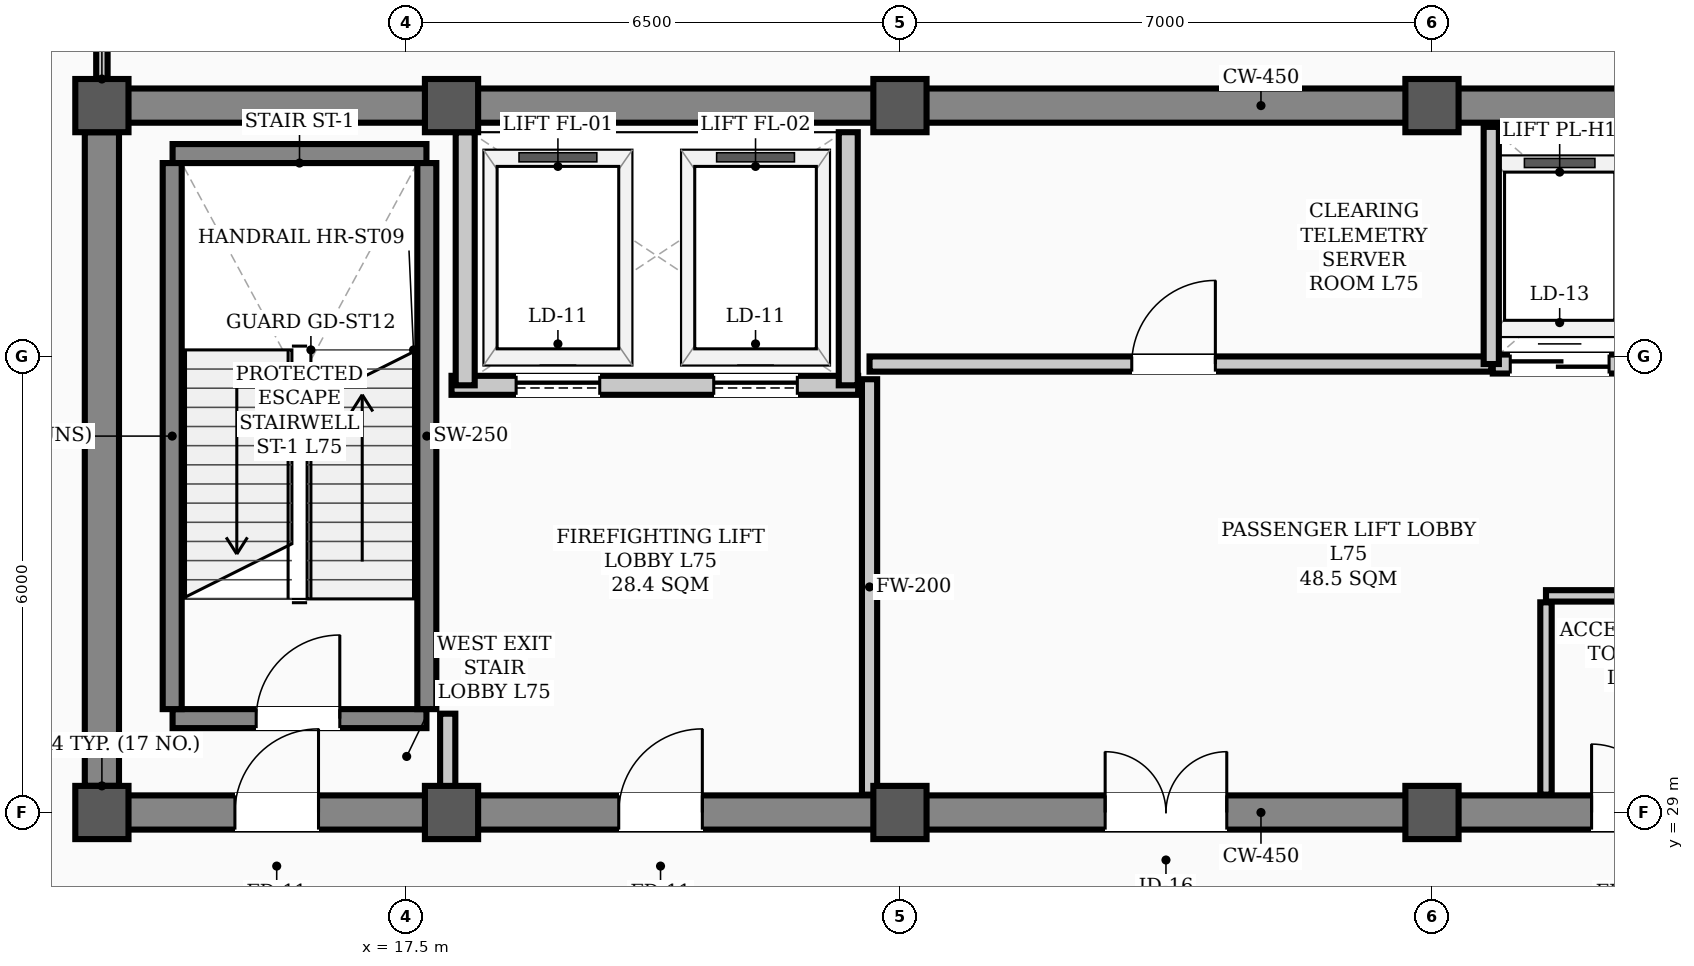
"""IFC4 building model, lengths in metres.
Left out: names, types, materials, properties, quantities, classifications, styles, units other than length and angle.
Written with IfcOpenShell. Run it as: python <this file> out.ifc"""

import sys

from ifc_helpers import new_model, si_unit, direction, frame, frame_2d, origin, origin_2d, place, context, subcontext, project, spatial, rectangle, hollow_rectangle, extrude, element, fill, save


model = new_model("IFC4")
c1 = context("Model", 3, precision=1e-05, world=origin(), true_north=direction((0.0, 1.0)))
c2 = subcontext(c1, "Body", "Model", "MODEL_VIEW")
j1 = project(units=[si_unit("LENGTHUNIT", "METRE"), si_unit("PLANEANGLEUNIT", "RADIAN")], contexts=[c1])
p1 = place(None, origin())
s1 = spatial("IfcSite", under=j1, at=p1, CompositionType="ELEMENT")
p2 = place(p1, origin())
s2 = spatial("IfcBuilding", under=s1, at=p2, CompositionType="ELEMENT")
p3 = place(p2, frame((0.0, 0.0, 300.8)))
s3 = spatial("IfcBuildingStorey", under=s2, at=p3, CompositionType="ELEMENT", Elevation=300.8)
for number, where, z_axis, x_axis in (
    (1, (13.5, 29.0, 0.0), (0.0, 0.0, 1.0), (1.0, 0.0, 0.0)),
    (2, (13.5, 38.3, 0.0), (0.0, 0.0, 1.0), (1.0, 0.0, 0.0)),
    (3, (18.1, 29.0, 0.0), (0.0, 0.0, 1.0), (1.0, 0.0, 0.0)),
    (4, (18.1, 38.3, 0.0), (0.0, 0.0, 1.0), (1.0, 0.0, 0.0)),
    (5, (24.0, 29.0, 0.0), (0.0, 0.0, 1.0), (1.0, 0.0, 0.0)),
    (6, (24.0, 38.3, 0.0), (0.0, 0.0, 1.0), (1.0, 0.0, 0.0)),
    (7, (31.0, 29.0, 0.0), (0.0, 0.0, 1.0), (1.0, 0.0, 0.0)),
    (8, (31.0, 38.3, 0.0), (0.0, 0.0, 1.0), (1.0, 0.0, 0.0)),
):
    element("IfcColumn", number, at=place(p3, frame(where, z_axis=z_axis, x_axis=x_axis)), inside=s3, PredefinedType="COLUMN", context=c2, shape_type="SweptSolid", body=[
        extrude(hollow_rectangle(XDim=0.7, YDim=0.7, WallThickness=0.028, InnerFilletRadius=0.014, OuterFilletRadius=0.042, at=origin_2d()), origin(), (0.0, 0.0, 1.0), 5.2),
    ])
p4 = place(p3, frame((13.5, 29.0, 0.0), z_axis=(0.0, 0.0, 1.0), x_axis=(1.0, 0.0, 0.0)))
e9 = element("IfcWall", 9, at=p4, inside=s3, PredefinedType="SHEAR", context=c2, shape_type="SweptSolid", body=[
    extrude(rectangle(XDim=30.5, YDim=0.45, at=frame_2d((15.25, 0.0))), origin(), (0.0, 0.0, 1.0), 4.9),
])
p5 = place(p4, frame((1.75, 0.0, 0.0)))
e10 = element("IfcOpeningElement", 10, at=p5, cuts=e9, PredefinedType="OPENING", context=c2, shape_type="SweptSolid", body=[
    extrude(rectangle(XDim=1.1, YDim=2.08, at=frame_2d((0.55, 1.04))), frame((0.0, 0.235, 0.0), z_axis=(0.0, -1.0, 0.0), x_axis=(1.0, 0.0, 0.0)), (0.0, 0.0, 1.0), 0.47),
])
p6 = place(p4, frame((26.7, 0.0, 0.0)))
e11 = element("IfcOpeningElement", 11, at=p6, cuts=e9, PredefinedType="OPENING", context=c2, shape_type="SweptSolid", body=[
    extrude(rectangle(XDim=1.1, YDim=2.08, at=frame_2d((0.55, 1.04))), frame((0.0, 0.235, 0.0), z_axis=(0.0, -1.0, 0.0), x_axis=(1.0, 0.0, 0.0)), (0.0, 0.0, 1.0), 0.47),
])
p7 = place(p4, frame((6.8, 0.0, 0.0)))
e12 = element("IfcOpeningElement", 12, at=p7, cuts=e9, PredefinedType="OPENING", context=c2, shape_type="SweptSolid", body=[
    extrude(rectangle(XDim=1.1, YDim=2.08, at=frame_2d((0.55, 1.04))), frame((0.0, 0.235, 0.0), z_axis=(0.0, -1.0, 0.0), x_axis=(1.0, 0.0, 0.0)), (0.0, 0.0, 1.0), 0.47),
])
p8 = place(p4, frame((13.2, 0.0, 0.0)))
e13 = element("IfcOpeningElement", 13, at=p8, cuts=e9, PredefinedType="OPENING", context=c2, shape_type="SweptSolid", body=[
    extrude(rectangle(XDim=1.6, YDim=2.08, at=frame_2d((0.8, 1.04))), frame((0.0, 0.235, 0.0), z_axis=(0.0, -1.0, 0.0), x_axis=(1.0, 0.0, 0.0)), (0.0, 0.0, 1.0), 0.47),
])
p9 = place(p4, frame((19.6, 0.0, 0.0)))
e14 = element("IfcOpeningElement", 14, at=p9, cuts=e9, PredefinedType="OPENING", context=c2, shape_type="SweptSolid", body=[
    extrude(rectangle(XDim=0.9, YDim=2.08, at=frame_2d((0.45, 1.04))), frame((0.0, 0.235, 0.0), z_axis=(0.0, -1.0, 0.0), x_axis=(1.0, 0.0, 0.0)), (0.0, 0.0, 1.0), 0.47),
])
p10 = place(p4, frame((21.6, 0.0, 0.0)))
e15 = element("IfcOpeningElement", 15, at=p10, cuts=e9, PredefinedType="OPENING", context=c2, shape_type="SweptSolid", body=[
    extrude(rectangle(XDim=0.9, YDim=2.08, at=frame_2d((0.45, 1.04))), frame((0.0, 0.235, 0.0), z_axis=(0.0, -1.0, 0.0), x_axis=(1.0, 0.0, 0.0)), (0.0, 0.0, 1.0), 0.47),
])
p11 = place(p3, frame((13.5, 38.3, 0.0), z_axis=(0.0, 0.0, 1.0), x_axis=(1.0, 0.0, 0.0)))
e16 = element("IfcWall", 16, at=p11, inside=s3, PredefinedType="SHEAR", context=c2, shape_type="SweptSolid", body=[
    extrude(rectangle(XDim=30.5, YDim=0.45, at=frame_2d((15.25, 0.0))), origin(), (0.0, 0.0, 1.0), 4.9),
])
p12 = place(p3, frame((13.5, 29.35, 0.0), z_axis=(0.0, 0.0, 1.0), x_axis=(0.0, 1.0, 0.0)))
e17 = element("IfcWall", 17, at=p12, inside=s3, PredefinedType="SHEAR", context=c2, shape_type="SweptSolid", body=[
    extrude(rectangle(XDim=8.6, YDim=0.45, at=frame_2d((4.3, 0.0))), origin(), (0.0, 0.0, 1.0), 4.9),
])
p13 = place(p3, frame((14.43, 30.235, 0.0), z_axis=(0.0, 0.0, 1.0), x_axis=(1.0, 0.0, 0.0)))
e18 = element("IfcWall", 18, at=p13, inside=s3, PredefinedType="STANDARD", context=c2, shape_type="SweptSolid", body=[
    extrude(rectangle(XDim=3.34, YDim=0.25, at=frame_2d((1.67, 0.0))), origin(), (0.0, 0.0, 1.0), 4.9),
])
p14 = place(p13, frame((1.1, 0.0, 0.0)))
e19 = element("IfcOpeningElement", 19, at=p14, cuts=e18, PredefinedType="OPENING", context=c2, shape_type="SweptSolid", body=[
    extrude(rectangle(XDim=1.1, YDim=2.08, at=frame_2d((0.55, 1.04))), frame((0.0, 0.135, 0.0), z_axis=(0.0, -1.0, 0.0), x_axis=(1.0, 0.0, 0.0)), (0.0, 0.0, 1.0), 0.27),
])
p15 = place(p3, frame((14.43, 37.669, 0.0), z_axis=(0.0, 0.0, 1.0), x_axis=(1.0, 0.0, 0.0)))
e20 = element("IfcWall", 20, at=p15, inside=s3, PredefinedType="STANDARD", context=c2, shape_type="SweptSolid", body=[
    extrude(rectangle(XDim=3.34, YDim=0.25, at=frame_2d((1.67, 0.0))), origin(), (0.0, 0.0, 1.0), 4.9),
])
for number, where, z_axis, x_axis in (
    (21, (14.425, 30.36, 0.0), (0.0, 0.0, 1.0), (0.0, 1.0, 0.0)),
    (22, (17.775, 30.36, 0.0), (0.0, 0.0, 1.0), (0.0, 1.0, 0.0)),
):
    element("IfcWall", number, at=place(p3, frame(where, z_axis=z_axis, x_axis=x_axis)), inside=s3, PredefinedType="STANDARD", context=c2, shape_type="SweptSolid", body=[
        extrude(rectangle(XDim=7.184, YDim=0.25, at=frame_2d((3.592, 0.0))), origin(), (0.0, 0.0, 1.0), 4.9),
    ])
p16 = place(p3, frame((18.1, 34.62, 0.0), z_axis=(0.0, 0.0, 1.0), x_axis=(1.0, 0.0, 0.0)))
e23 = element("IfcWall", 23, at=p16, inside=s3, PredefinedType="STANDARD", context=c2, shape_type="SweptSolid", body=[
    extrude(rectangle(XDim=5.35, YDim=0.25, at=frame_2d((2.675, 0.0))), origin(), (0.0, 0.0, 1.0), 4.9),
])
p17 = place(p16, frame((0.85, 0.0, 0.0)))
e24 = element("IfcOpeningElement", 24, at=p17, cuts=e23, PredefinedType="OPENING", context=c2, shape_type="SweptSolid", body=[
    extrude(rectangle(XDim=1.1, YDim=2.08, at=frame_2d((0.55, 1.04))), frame((0.0, 0.135, 0.0), z_axis=(0.0, -1.0, 0.0), x_axis=(1.0, 0.0, 0.0)), (0.0, 0.0, 1.0), 0.27),
])
p18 = place(p16, frame((3.45, 0.0, 0.0)))
e25 = element("IfcOpeningElement", 25, at=p18, cuts=e23, PredefinedType="OPENING", context=c2, shape_type="SweptSolid", body=[
    extrude(rectangle(XDim=1.1, YDim=2.08, at=frame_2d((0.55, 1.04))), frame((0.0, 0.135, 0.0), z_axis=(0.0, -1.0, 0.0), x_axis=(1.0, 0.0, 0.0)), (0.0, 0.0, 1.0), 0.27),
])
for number, where, z_axis, x_axis in (
    (26, (18.28, 34.62, 0.0), (0.0, 0.0, 1.0), (0.0, 1.0, 0.0)),
    (27, (23.32, 34.62, 0.0), (0.0, 0.0, 1.0), (0.0, 1.0, 0.0)),
):
    element("IfcWall", number, at=place(p3, frame(where, z_axis=z_axis, x_axis=x_axis)), inside=s3, PredefinedType="STANDARD", context=c2, shape_type="SweptSolid", body=[
        extrude(rectangle(XDim=3.33, YDim=0.25, at=frame_2d((1.665, 0.0))), origin(), (0.0, 0.0, 1.0), 4.9),
    ])
p19 = place(p3, frame((31.8, 34.9, 0.0), z_axis=(0.0, 0.0, 1.0), x_axis=(1.0, 0.0, 0.0)))
e28 = element("IfcWall", 28, at=p19, inside=s3, PredefinedType="STANDARD", context=c2, shape_type="SweptSolid", body=[
    extrude(rectangle(XDim=3.6, YDim=0.25, at=frame_2d((1.8, 0.0))), origin(), (0.0, 0.0, 1.0), 4.9),
])
p20 = place(p19, frame((0.23, 0.0, 0.0)))
e29 = element("IfcOpeningElement", 29, at=p20, cuts=e28, PredefinedType="OPENING", context=c2, shape_type="SweptSolid", body=[
    extrude(rectangle(XDim=1.3, YDim=2.08, at=frame_2d((0.65, 1.04))), frame((0.0, 0.135, 0.0), z_axis=(0.0, -1.0, 0.0), x_axis=(1.0, 0.0, 0.0)), (0.0, 0.0, 1.0), 0.27),
])
p21 = place(p19, frame((2.03, 0.0, 0.0)))
e30 = element("IfcOpeningElement", 30, at=p21, cuts=e28, PredefinedType="OPENING", context=c2, shape_type="SweptSolid", body=[
    extrude(rectangle(XDim=1.3, YDim=2.08, at=frame_2d((0.65, 1.04))), frame((0.0, 0.135, 0.0), z_axis=(0.0, -1.0, 0.0), x_axis=(1.0, 0.0, 0.0)), (0.0, 0.0, 1.0), 0.27),
])
p22 = place(p3, frame((23.6, 34.9, 0.0), z_axis=(0.0, 0.0, 1.0), x_axis=(1.0, 0.0, 0.0)))
e31 = element("IfcWall", 31, at=p22, inside=s3, PredefinedType="STANDARD", context=c2, shape_type="SweptSolid", body=[
    extrude(rectangle(XDim=8.18, YDim=0.2, at=frame_2d((4.09, 0.0))), origin(), (0.0, 0.0, 1.0), 4.9),
])
p23 = place(p22, frame((3.45, 0.0, 0.0)))
e32 = element("IfcOpeningElement", 32, at=p23, cuts=e31, PredefinedType="OPENING", context=c2, shape_type="SweptSolid", body=[
    extrude(rectangle(XDim=1.1, YDim=2.08, at=frame_2d((0.55, 1.04))), frame((0.0, 0.11, 0.0), z_axis=(0.0, -1.0, 0.0), x_axis=(1.0, 0.0, 0.0)), (0.0, 0.0, 1.0), 0.22),
])
p24 = place(p3, frame((32.5, 31.85, 0.0), z_axis=(0.0, 0.0, 1.0), x_axis=(1.0, 0.0, 0.0)))
e33 = element("IfcWall", 33, at=p24, inside=s3, PredefinedType="PARTITIONING", context=c2, shape_type="SweptSolid", body=[
    extrude(rectangle(XDim=4.1, YDim=0.15, at=frame_2d((2.05, 0.0))), origin(), (0.0, 0.0, 1.0), 4.9),
])
p25 = place(p3, frame((18.05, 29.235, 0.0), z_axis=(0.0, 0.0, 1.0), x_axis=(0.0, 1.0, 0.0)))
e34 = element("IfcWall", 34, at=p25, inside=s3, PredefinedType="STANDARD", context=c2, shape_type="SweptSolid", body=[
    extrude(rectangle(XDim=1.065, YDim=0.2, at=frame_2d((0.532, 0.0))), origin(), (0.0, 0.0, 1.0), 4.9),
])
p26 = place(p3, frame((23.6, 29.235, 0.0), z_axis=(0.0, 0.0, 1.0), x_axis=(0.0, 1.0, 0.0)))
e35 = element("IfcWall", 35, at=p26, inside=s3, PredefinedType="STANDARD", context=c2, shape_type="SweptSolid", body=[
    extrude(rectangle(XDim=5.465, YDim=0.2, at=frame_2d((2.732, 0.0))), origin(), (0.0, 0.0, 1.0), 3.48),
])
p27 = place(p3, frame((32.5, 29.235, 0.0), z_axis=(0.0, 0.0, 1.0), x_axis=(0.0, 1.0, 0.0)))
e36 = element("IfcWall", 36, at=p27, inside=s3, PredefinedType="PARTITIONING", context=c2, shape_type="SweptSolid", body=[
    extrude(rectangle(XDim=2.53, YDim=0.15, at=frame_2d((1.265, 0.0))), origin(), (0.0, 0.0, 1.0), 3.48),
])
p28 = place(p3, frame((13.5, 38.535, 0.0), z_axis=(0.0, 0.0, 1.0), x_axis=(0.0, 1.0, 0.0)))
e37 = element("IfcWall", 37, at=p28, inside=s3, PredefinedType="PARTITIONING", context=c2, shape_type="SweptSolid", body=[
    extrude(rectangle(XDim=2.405, YDim=0.15, at=frame_2d((1.203, 0.0))), origin(), (0.0, 0.0, 1.0), 4.9),
])
p29 = place(p3, frame((31.78, 34.9, 0.0), z_axis=(0.0, 0.0, 1.0), x_axis=(0.0, 1.0, 0.0)))
e38 = element("IfcWall", 38, at=p29, inside=s3, PredefinedType="STANDARD", context=c2, shape_type="SweptSolid", body=[
    extrude(rectangle(XDim=3.12, YDim=0.2, at=frame_2d((1.56, 0.0))), origin(), (0.0, 0.0, 1.0), 3.48),
])
p30 = place(p14, origin())
e39 = element("IfcDoor", 39, at=p30, inside=s3, OperationType="SINGLE_SWING_RIGHT", PredefinedType="DOOR", context=c2, shape_type="SweptSolid", body=[
    extrude(rectangle(XDim=1.1, YDim=2.08, at=frame_2d((0.55, 1.04))), frame((0.0, 0.025, 0.0), z_axis=(0.0, -1.0, 0.0), x_axis=(1.0, 0.0, 0.0)), (0.0, 0.0, 1.0), 0.05),
])
fill(e19, e39)
p31 = place(p5, origin())
e40 = element("IfcDoor", 40, at=p31, inside=s3, OperationType="SINGLE_SWING_RIGHT", PredefinedType="DOOR", context=c2, shape_type="SweptSolid", body=[
    extrude(rectangle(XDim=1.1, YDim=2.08, at=frame_2d((0.55, 1.04))), frame((0.0, 0.025, 0.0), z_axis=(0.0, -1.0, 0.0), x_axis=(1.0, 0.0, 0.0)), (0.0, 0.0, 1.0), 0.05),
])
fill(e10, e40)
p32 = place(p7, origin())
e41 = element("IfcDoor", 41, at=p32, inside=s3, OperationType="SINGLE_SWING_RIGHT", PredefinedType="DOOR", context=c2, shape_type="SweptSolid", body=[
    extrude(rectangle(XDim=1.1, YDim=2.08, at=frame_2d((0.55, 1.04))), frame((0.0, 0.025, 0.0), z_axis=(0.0, -1.0, 0.0), x_axis=(1.0, 0.0, 0.0)), (0.0, 0.0, 1.0), 0.05),
])
fill(e12, e41)
p33 = place(p8, origin())
e42 = element("IfcDoor", 42, at=p33, inside=s3, OperationType="DOUBLE_DOOR_SINGLE_SWING", PredefinedType="DOOR", context=c2, shape_type="SweptSolid", body=[
    extrude(rectangle(XDim=1.6, YDim=2.08, at=frame_2d((0.8, 1.04))), frame((0.0, 0.025, 0.0), z_axis=(0.0, -1.0, 0.0), x_axis=(1.0, 0.0, 0.0)), (0.0, 0.0, 1.0), 0.05),
])
fill(e13, e42)
p34 = place(p23, origin())
e43 = element("IfcDoor", 43, at=p34, inside=s3, OperationType="SINGLE_SWING_RIGHT", PredefinedType="DOOR", context=c2, shape_type="SweptSolid", body=[
    extrude(rectangle(XDim=1.1, YDim=2.08, at=frame_2d((0.55, 1.04))), frame((0.0, 0.025, 0.0), z_axis=(0.0, -1.0, 0.0), x_axis=(1.0, 0.0, 0.0)), (0.0, 0.0, 1.0), 0.05),
])
fill(e32, e43)
p35 = place(p9, origin())
e44 = element("IfcDoor", 44, at=p35, inside=s3, OperationType="SINGLE_SWING_LEFT", PredefinedType="DOOR", context=c2, shape_type="SweptSolid", body=[
    extrude(rectangle(XDim=0.9, YDim=2.08, at=frame_2d((0.45, 1.04))), frame((0.0, 0.025, 0.0), z_axis=(0.0, -1.0, 0.0), x_axis=(1.0, 0.0, 0.0)), (0.0, 0.0, 1.0), 0.05),
])
fill(e14, e44)
p36 = place(p17, origin())
e45 = element("IfcDoor", 45, at=p36, inside=s3, OperationType="SLIDING_TO_LEFT", PredefinedType="DOOR", context=c2, shape_type="SweptSolid", body=[
    extrude(rectangle(XDim=1.1, YDim=2.08, at=frame_2d((0.55, 1.04))), frame((0.0, 0.025, 0.0), z_axis=(0.0, -1.0, 0.0), x_axis=(1.0, 0.0, 0.0)), (0.0, 0.0, 1.0), 0.05),
])
fill(e24, e45)
p37 = place(p18, origin())
e46 = element("IfcDoor", 46, at=p37, inside=s3, OperationType="SLIDING_TO_LEFT", PredefinedType="DOOR", context=c2, shape_type="SweptSolid", body=[
    extrude(rectangle(XDim=1.1, YDim=2.08, at=frame_2d((0.55, 1.04))), frame((0.0, 0.025, 0.0), z_axis=(0.0, -1.0, 0.0), x_axis=(1.0, 0.0, 0.0)), (0.0, 0.0, 1.0), 0.05),
])
fill(e25, e46)
p38 = place(p20, origin())
e47 = element("IfcDoor", 47, at=p38, inside=s3, OperationType="DOUBLE_DOOR_SLIDING", PredefinedType="DOOR", context=c2, shape_type="SweptSolid", body=[
    extrude(rectangle(XDim=1.3, YDim=2.08, at=frame_2d((0.65, 1.04))), frame((0.0, 0.025, 0.0), z_axis=(0.0, -1.0, 0.0), x_axis=(1.0, 0.0, 0.0)), (0.0, 0.0, 1.0), 0.05),
])
fill(e29, e47)
save(model, sys.argv[1])
